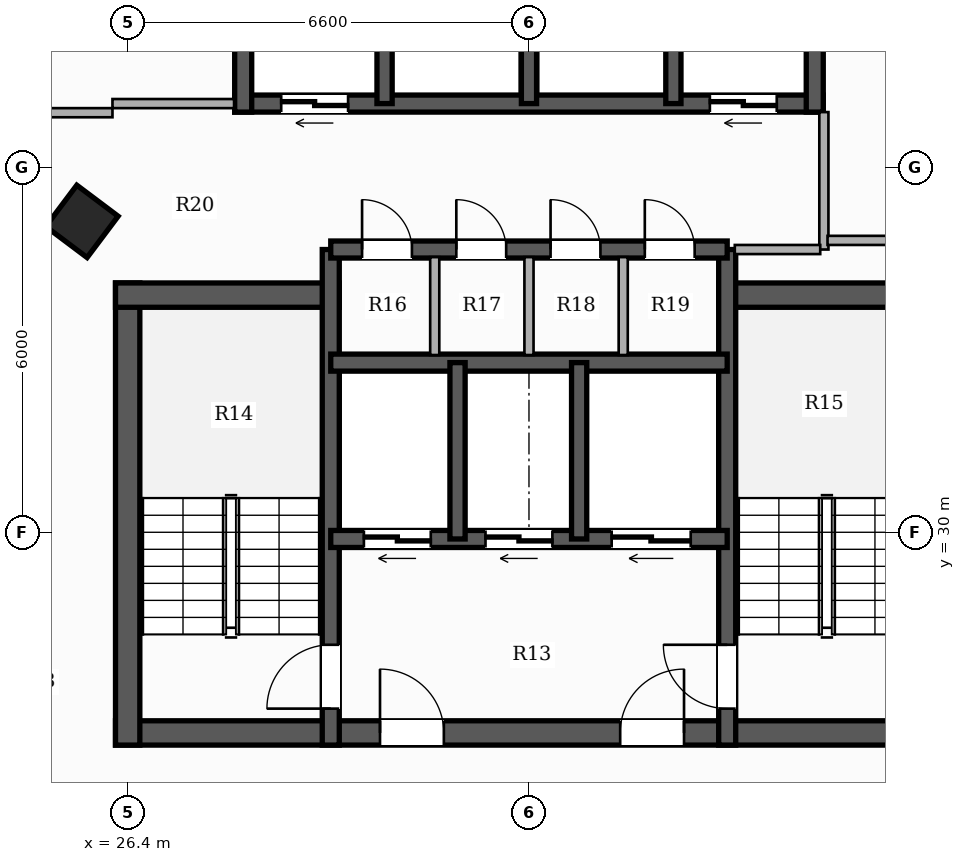
"""IFC4 building model, lengths in metres.
Left out: names, types, materials, properties, quantities, classifications, styles, units other than length and angle.
Written with IfcOpenShell. Run it as: python <this file> out.ifc"""

import sys

from ifc_helpers import new_model, si_unit, direction, frame, frame_2d, origin, origin_2d, place, context, subcontext, project, spatial, rectangle, hollow_rectangle, extrude, element, fill, save


model = new_model("IFC4")
c1 = context("Model", 3, precision=1e-05, world=origin(), true_north=direction((0.0, 1.0)))
c2 = subcontext(c1, "Body", "Model", "MODEL_VIEW")
j1 = project(units=[si_unit("LENGTHUNIT", "METRE"), si_unit("PLANEANGLEUNIT", "RADIAN")], contexts=[c1])
p1 = place(None, origin())
s1 = spatial("IfcSite", under=j1, at=p1, CompositionType="ELEMENT")
p2 = place(p1, origin())
s2 = spatial("IfcBuilding", under=s1, at=p2, CompositionType="ELEMENT")
p3 = place(p2, frame((0.0, 0.0, 133.1)))
s3 = spatial("IfcBuildingStorey", under=s2, at=p3, CompositionType="ELEMENT", Elevation=133.1)
p4 = place(p3, frame((26.2, 26.7, 0.0), z_axis=(0.0, 0.0, 1.0), x_axis=(1.0, 0.0, 0.0)))
e1 = element("IfcWall", 1, at=p4, inside=s3, PredefinedType="SHEAR", context=c2, shape_type="SweptSolid", body=[
    extrude(rectangle(XDim=13.6, YDim=0.4, at=frame_2d((6.8, 0.0))), origin(), (0.0, 0.0, 1.0), 3.3),
])
p5 = place(p4, frame((4.35, 0.0, 0.0)))
e2 = element("IfcOpeningElement", 2, at=p5, cuts=e1, PredefinedType="OPENING", context=c2, shape_type="SweptSolid", body=[
    extrude(rectangle(XDim=1.05, YDim=2.15, at=frame_2d((0.525, 1.075))), frame((0.0, 0.21, 0.0), z_axis=(0.0, -1.0, 0.0), x_axis=(1.0, 0.0, 0.0)), (0.0, 0.0, 1.0), 0.42),
])
p6 = place(p4, frame((8.3, 0.0, 0.0)))
e3 = element("IfcOpeningElement", 3, at=p6, cuts=e1, PredefinedType="OPENING", context=c2, shape_type="SweptSolid", body=[
    extrude(rectangle(XDim=1.05, YDim=2.15, at=frame_2d((0.525, 1.075))), frame((0.0, 0.21, 0.0), z_axis=(0.0, -1.0, 0.0), x_axis=(1.0, 0.0, 0.0)), (0.0, 0.0, 1.0), 0.42),
])
p7 = place(p3, frame((26.4, 26.5, 0.0), z_axis=(0.0, 0.0, 1.0), x_axis=(0.0, 1.0, 0.0)))
e4 = element("IfcWall", 4, at=p7, inside=s3, PredefinedType="SHEAR", context=c2, shape_type="SweptSolid", body=[
    extrude(rectangle(XDim=7.6, YDim=0.4, at=frame_2d((3.8, 0.0))), origin(), (0.0, 0.0, 1.0), 3.3),
])
for number, where, z_axis, x_axis in (
    (5, (26.2, 33.9, 0.0), (0.0, 0.0, 1.0), (1.0, 0.0, 0.0)),
    (6, (36.12, 33.9, 0.0), (0.0, 0.0, 1.0), (1.0, 0.0, 0.0)),
):
    element("IfcWall", number, at=place(p3, frame(where, z_axis=z_axis, x_axis=x_axis)), inside=s3, PredefinedType="SHEAR", context=c2, shape_type="SweptSolid", body=[
        extrude(rectangle(XDim=3.68, YDim=0.4, at=frame_2d((1.84, 0.0))), origin(), (0.0, 0.0, 1.0), 3.3),
    ])
p8 = place(p3, frame((29.74, 26.5, 0.0), z_axis=(0.0, 0.0, 1.0), x_axis=(0.0, 1.0, 0.0)))
e7 = element("IfcWall", 7, at=p8, inside=s3, PredefinedType="SHEAR", context=c2, shape_type="SweptSolid", body=[
    extrude(rectangle(XDim=8.15, YDim=0.28, at=frame_2d((4.075, 0.0))), origin(), (0.0, 0.0, 1.0), 3.3),
])
p9 = place(p8, frame((0.6, 0.0, 0.0)))
e8 = element("IfcOpeningElement", 8, at=p9, cuts=e7, PredefinedType="OPENING", context=c2, shape_type="SweptSolid", body=[
    extrude(rectangle(XDim=1.05, YDim=2.15, at=frame_2d((0.525, 1.075))), frame((0.0, 0.15, 0.0), z_axis=(0.0, -1.0, 0.0), x_axis=(1.0, 0.0, 0.0)), (0.0, 0.0, 1.0), 0.3),
])
p10 = place(p3, frame((36.26, 26.5, 0.0), z_axis=(0.0, 0.0, 1.0), x_axis=(0.0, 1.0, 0.0)))
e9 = element("IfcWall", 9, at=p10, inside=s3, PredefinedType="SHEAR", context=c2, shape_type="SweptSolid", body=[
    extrude(rectangle(XDim=8.15, YDim=0.28, at=frame_2d((4.075, 0.0))), origin(), (0.0, 0.0, 1.0), 3.3),
])
p11 = place(p10, frame((0.6, 0.0, 0.0)))
e10 = element("IfcOpeningElement", 10, at=p11, cuts=e9, PredefinedType="OPENING", context=c2, shape_type="SweptSolid", body=[
    extrude(rectangle(XDim=1.05, YDim=2.15, at=frame_2d((0.525, 1.075))), frame((0.0, 0.15, 0.0), z_axis=(0.0, -1.0, 0.0), x_axis=(1.0, 0.0, 0.0)), (0.0, 0.0, 1.0), 0.3),
])
p12 = place(p3, frame((36.26, 29.89, 0.0), z_axis=(0.0, 0.0, 1.0), x_axis=(-1.0, 0.0, 0.0)))
e11 = element("IfcWall", 11, at=p12, inside=s3, PredefinedType="SHEAR", context=c2, shape_type="SweptSolid", body=[
    extrude(rectangle(XDim=6.52, YDim=0.28, at=frame_2d((3.26, 0.0))), origin(), (0.0, 0.0, 1.0), 3.3),
])
p13 = place(p12, frame((4.875, 0.0, 0.0)))
e12 = element("IfcOpeningElement", 12, at=p13, cuts=e11, PredefinedType="OPENING", context=c2, shape_type="SweptSolid", body=[
    extrude(rectangle(XDim=1.1, YDim=2.2, at=frame_2d((0.55, 1.1))), frame((0.0, 0.15, 0.0), z_axis=(0.0, -1.0, 0.0), x_axis=(1.0, 0.0, 0.0)), (0.0, 0.0, 1.0), 0.3),
])
p14 = place(p12, frame((2.875, 0.0, 0.0)))
e13 = element("IfcOpeningElement", 13, at=p14, cuts=e11, PredefinedType="OPENING", context=c2, shape_type="SweptSolid", body=[
    extrude(rectangle(XDim=1.1, YDim=2.2, at=frame_2d((0.55, 1.1))), frame((0.0, 0.15, 0.0), z_axis=(0.0, -1.0, 0.0), x_axis=(1.0, 0.0, 0.0)), (0.0, 0.0, 1.0), 0.3),
])
p15 = place(p12, frame((0.6, 0.0, 0.0)))
e14 = element("IfcOpeningElement", 14, at=p15, cuts=e11, PredefinedType="OPENING", context=c2, shape_type="SweptSolid", body=[
    extrude(rectangle(XDim=1.3, YDim=2.2, at=frame_2d((0.65, 1.1))), frame((0.0, 0.15, 0.0), z_axis=(0.0, -1.0, 0.0), x_axis=(1.0, 0.0, 0.0)), (0.0, 0.0, 1.0), 0.3),
])
p16 = place(p3, frame((29.74, 32.79, 0.0), z_axis=(0.0, 0.0, 1.0), x_axis=(1.0, 0.0, 0.0)))
e15 = element("IfcWall", 15, at=p16, inside=s3, PredefinedType="SHEAR", context=c2, shape_type="SweptSolid", body=[
    extrude(rectangle(XDim=6.52, YDim=0.28, at=frame_2d((3.26, 0.0))), origin(), (0.0, 0.0, 1.0), 3.3),
])
for number, where, z_axis, x_axis in (
    (16, (31.825, 29.89, 0.0), (0.0, 0.0, 1.0), (0.0, 1.0, 0.0)),
    (17, (33.825, 29.89, 0.0), (0.0, 0.0, 1.0), (0.0, 1.0, 0.0)),
):
    element("IfcWall", number, at=place(p3, frame(where, z_axis=z_axis, x_axis=x_axis)), inside=s3, PredefinedType="SHEAR", context=c2, shape_type="SweptSolid", body=[
        extrude(rectangle(XDim=2.9, YDim=0.25, at=frame_2d((1.45, 0.0))), origin(), (0.0, 0.0, 1.0), 3.3),
    ])
p17 = place(p3, frame((29.74, 34.65, 0.0), z_axis=(0.0, 0.0, 1.0), x_axis=(1.0, 0.0, 0.0)))
e18 = element("IfcWall", 18, at=p17, inside=s3, PredefinedType="SHEAR", context=c2, shape_type="SweptSolid", body=[
    extrude(rectangle(XDim=6.52, YDim=0.28, at=frame_2d((3.26, 0.0))), origin(), (0.0, 0.0, 1.0), 3.3),
])
p18 = place(p17, frame((0.515, 0.0, 0.0)))
e19 = element("IfcOpeningElement", 19, at=p18, cuts=e18, PredefinedType="OPENING", context=c2, shape_type="SweptSolid", body=[
    extrude(rectangle(XDim=0.82, YDim=2.1, at=frame_2d((0.41, 1.05))), frame((0.0, 0.15, 0.0), z_axis=(0.0, -1.0, 0.0), x_axis=(1.0, 0.0, 0.0)), (0.0, 0.0, 1.0), 0.3),
])
p19 = place(p17, frame((2.065, 0.0, 0.0)))
e20 = element("IfcOpeningElement", 20, at=p19, cuts=e18, PredefinedType="OPENING", context=c2, shape_type="SweptSolid", body=[
    extrude(rectangle(XDim=0.82, YDim=2.1, at=frame_2d((0.41, 1.05))), frame((0.0, 0.15, 0.0), z_axis=(0.0, -1.0, 0.0), x_axis=(1.0, 0.0, 0.0)), (0.0, 0.0, 1.0), 0.3),
])
p20 = place(p17, frame((3.615, 0.0, 0.0)))
e21 = element("IfcOpeningElement", 21, at=p20, cuts=e18, PredefinedType="OPENING", context=c2, shape_type="SweptSolid", body=[
    extrude(rectangle(XDim=0.82, YDim=2.1, at=frame_2d((0.41, 1.05))), frame((0.0, 0.15, 0.0), z_axis=(0.0, -1.0, 0.0), x_axis=(1.0, 0.0, 0.0)), (0.0, 0.0, 1.0), 0.3),
])
p21 = place(p17, frame((5.165, 0.0, 0.0)))
e22 = element("IfcOpeningElement", 22, at=p21, cuts=e18, PredefinedType="OPENING", context=c2, shape_type="SweptSolid", body=[
    extrude(rectangle(XDim=0.82, YDim=2.1, at=frame_2d((0.41, 1.05))), frame((0.0, 0.15, 0.0), z_axis=(0.0, -1.0, 0.0), x_axis=(1.0, 0.0, 0.0)), (0.0, 0.0, 1.0), 0.3),
])
p22 = place(p3, frame((37.84, 37.05, 0.0), z_axis=(0.0, 0.0, 1.0), x_axis=(-1.0, 0.0, 0.0)))
e23 = element("IfcWall", 23, at=p22, inside=s3, PredefinedType="SHEAR", context=c2, shape_type="SweptSolid", body=[
    extrude(rectangle(XDim=9.68, YDim=0.28, at=frame_2d((4.84, 0.0))), origin(), (0.0, 0.0, 1.0), 3.3),
])
p23 = place(p22, frame((7.815, 0.0, 0.0)))
e24 = element("IfcOpeningElement", 24, at=p23, cuts=e23, PredefinedType="OPENING", context=c2, shape_type="SweptSolid", body=[
    extrude(rectangle(XDim=1.1, YDim=2.2, at=frame_2d((0.55, 1.1))), frame((0.0, 0.15, 0.0), z_axis=(0.0, -1.0, 0.0), x_axis=(1.0, 0.0, 0.0)), (0.0, 0.0, 1.0), 0.3),
])
p24 = place(p22, frame((0.765, 0.0, 0.0)))
e25 = element("IfcOpeningElement", 25, at=p24, cuts=e23, PredefinedType="OPENING", context=c2, shape_type="SweptSolid", body=[
    extrude(rectangle(XDim=1.1, YDim=2.2, at=frame_2d((0.55, 1.1))), frame((0.0, 0.15, 0.0), z_axis=(0.0, -1.0, 0.0), x_axis=(1.0, 0.0, 0.0)), (0.0, 0.0, 1.0), 0.3),
])
for number, where, z_axis, x_axis in (
    (26, (28.3, 36.91, 0.0), (0.0, 0.0, 1.0), (0.0, 1.0, 0.0)),
    (27, (37.7, 36.91, 0.0), (0.0, 0.0, 1.0), (0.0, 1.0, 0.0)),
):
    element("IfcWall", number, at=place(p3, frame(where, z_axis=z_axis, x_axis=x_axis)), inside=s3, PredefinedType="SHEAR", context=c2, shape_type="SweptSolid", body=[
        extrude(rectangle(XDim=2.83, YDim=0.28, at=frame_2d((1.415, 0.0))), origin(), (0.0, 0.0, 1.0), 3.3),
    ])
for number, where, z_axis, x_axis in (
    (28, (30.625, 37.05, 0.0), (0.0, 0.0, 1.0), (0.0, 1.0, 0.0)),
    (29, (33.0, 37.05, 0.0), (0.0, 0.0, 1.0), (0.0, 1.0, 0.0)),
    (30, (35.375, 37.05, 0.0), (0.0, 0.0, 1.0), (0.0, 1.0, 0.0)),
):
    element("IfcWall", number, at=place(p3, frame(where, z_axis=z_axis, x_axis=x_axis)), inside=s3, PredefinedType="SHEAR", context=c2, shape_type="SweptSolid", body=[
        extrude(rectangle(XDim=2.55, YDim=0.25, at=frame_2d((1.275, 0.0))), origin(), (0.0, 0.0, 1.0), 3.3),
    ])
p25 = place(p3, frame((25.648, 35.113, 0.0), z_axis=(0.0, 0.0, 1.0), x_axis=(0.600420225326, 0.799684658487, 0.0)))
e31 = element("IfcColumn", 31, at=p25, inside=s3, PredefinedType="COLUMN", context=c2, shape_type="SweptSolid", body=[
    extrude(hollow_rectangle(XDim=0.85, YDim=0.85, WallThickness=0.028, at=origin_2d()), origin(), (0.0, 0.0, 1.0), 3.3),
])
p26 = place(p3, frame((37.85, 34.65, 0.0), z_axis=(0.0, 0.0, 1.0), x_axis=(0.0, 1.0, 0.0)))
e32 = element("IfcWall", 32, at=p26, inside=s3, PredefinedType="PARTITIONING", context=c2, shape_type="SweptSolid", body=[
    extrude(rectangle(XDim=2.26, YDim=0.15, at=frame_2d((1.13, 0.0))), origin(), (0.0, 0.0, 1.0), 3.06),
])
p27 = place(p3, frame((36.385, 34.65, 0.0), z_axis=(0.0, 0.0, 1.0), x_axis=(1.0, 0.0, 0.0)))
e33 = element("IfcWall", 33, at=p27, inside=s3, PredefinedType="PARTITIONING", context=c2, shape_type="SweptSolid", body=[
    extrude(rectangle(XDim=1.405, YDim=0.15, at=frame_2d((0.703, 0.0))), origin(), (0.0, 0.0, 1.0), 2.425),
])
for number, where, z_axis, x_axis in (
    (34, (31.45, 32.915, 0.0), (0.0, 0.0, 1.0), (0.0, 1.0, 0.0)),
    (35, (33.0, 32.915, 0.0), (0.0, 0.0, 1.0), (0.0, 1.0, 0.0)),
    (36, (34.55, 32.915, 0.0), (0.0, 0.0, 1.0), (0.0, 1.0, 0.0)),
):
    element("IfcWall", number, at=place(p3, frame(where, z_axis=z_axis, x_axis=x_axis)), inside=s3, PredefinedType="PARTITIONING", context=c2, shape_type="SweptSolid", body=[
        extrude(rectangle(XDim=1.61, YDim=0.15, at=frame_2d((0.805, 0.0))), origin(), (0.0, 0.0, 1.0), 3.06),
    ])
p28 = place(p3, frame((23.56, 36.9, 0.0), z_axis=(0.0, 0.0, 1.0), x_axis=(1.0, 0.0, 0.0)))
e37 = element("IfcWall", 37, at=p28, inside=s3, PredefinedType="PARTITIONING", context=c2, shape_type="SweptSolid", body=[
    extrude(rectangle(XDim=2.59, YDim=0.15, at=frame_2d((1.295, 0.0))), origin(), (0.0, 0.0, 1.0), 2.413),
])
p29 = place(p28, frame((0.515, 0.0, 0.0)))
e38 = element("IfcOpeningElement", 38, at=p29, cuts=e37, PredefinedType="OPENING", context=c2, shape_type="SweptSolid", body=[
    extrude(rectangle(XDim=0.88, YDim=2.1, at=frame_2d((0.44, 1.05))), frame((0.0, 0.085, 0.0), z_axis=(0.0, -1.0, 0.0), x_axis=(1.0, 0.0, 0.0)), (0.0, 0.0, 1.0), 0.17),
])
p30 = place(p3, frame((26.15, 37.05, 0.0), z_axis=(0.0, 0.0, 1.0), x_axis=(1.0, 0.0, 0.0)))
e39 = element("IfcWall", 39, at=p30, inside=s3, PredefinedType="PARTITIONING", context=c2, shape_type="SweptSolid", body=[
    extrude(rectangle(XDim=2.0, YDim=0.15, at=frame_2d((1.0, 0.0))), origin(), (0.0, 0.0, 1.0), 2.413),
])
p31 = place(p3, frame((37.91, 34.8, 0.0), z_axis=(0.0, 0.0, 1.0), x_axis=(1.0, 0.0, 0.0)))
e40 = element("IfcWall", 40, at=p31, inside=s3, PredefinedType="PARTITIONING", context=c2, shape_type="SweptSolid", body=[
    extrude(rectangle(XDim=1.94, YDim=0.15, at=frame_2d((0.97, 0.0))), origin(), (0.0, 0.0, 1.0), 2.721),
])
p32 = place(p9, origin())
e41 = element("IfcDoor", 41, at=p32, inside=s3, OperationType="SINGLE_SWING_LEFT", PredefinedType="DOOR", context=c2, shape_type="SweptSolid", body=[
    extrude(rectangle(XDim=1.05, YDim=2.15, at=frame_2d((0.525, 1.075))), frame((0.0, 0.025, 0.0), z_axis=(0.0, -1.0, 0.0), x_axis=(1.0, 0.0, 0.0)), (0.0, 0.0, 1.0), 0.05),
])
fill(e8, e41)
p33 = place(p11, origin())
e42 = element("IfcDoor", 42, at=p33, inside=s3, OperationType="SINGLE_SWING_RIGHT", PredefinedType="DOOR", context=c2, shape_type="SweptSolid", body=[
    extrude(rectangle(XDim=1.05, YDim=2.15, at=frame_2d((0.525, 1.075))), frame((0.0, 0.025, 0.0), z_axis=(0.0, -1.0, 0.0), x_axis=(1.0, 0.0, 0.0)), (0.0, 0.0, 1.0), 0.05),
])
fill(e10, e42)
p34 = place(p5, origin())
e43 = element("IfcDoor", 43, at=p34, inside=s3, OperationType="SINGLE_SWING_LEFT", PredefinedType="DOOR", context=c2, shape_type="SweptSolid", body=[
    extrude(rectangle(XDim=1.05, YDim=2.15, at=frame_2d((0.525, 1.075))), frame((0.0, 0.025, 0.0), z_axis=(0.0, -1.0, 0.0), x_axis=(1.0, 0.0, 0.0)), (0.0, 0.0, 1.0), 0.05),
])
fill(e2, e43)
p35 = place(p6, origin())
e44 = element("IfcDoor", 44, at=p35, inside=s3, OperationType="SINGLE_SWING_RIGHT", PredefinedType="DOOR", context=c2, shape_type="SweptSolid", body=[
    extrude(rectangle(XDim=1.05, YDim=2.15, at=frame_2d((0.525, 1.075))), frame((0.0, 0.025, 0.0), z_axis=(0.0, -1.0, 0.0), x_axis=(1.0, 0.0, 0.0)), (0.0, 0.0, 1.0), 0.05),
])
fill(e3, e44)
p36 = place(p13, origin())
e45 = element("IfcDoor", 45, at=p36, inside=s3, OperationType="DOUBLE_DOOR_SLIDING", PredefinedType="DOOR", context=c2, shape_type="SweptSolid", body=[
    extrude(rectangle(XDim=1.1, YDim=2.2, at=frame_2d((0.55, 1.1))), frame((0.0, 0.025, 0.0), z_axis=(0.0, -1.0, 0.0), x_axis=(1.0, 0.0, 0.0)), (0.0, 0.0, 1.0), 0.05),
])
fill(e12, e45)
p37 = place(p14, origin())
e46 = element("IfcDoor", 46, at=p37, inside=s3, OperationType="DOUBLE_DOOR_SLIDING", PredefinedType="DOOR", context=c2, shape_type="SweptSolid", body=[
    extrude(rectangle(XDim=1.1, YDim=2.2, at=frame_2d((0.55, 1.1))), frame((0.0, 0.025, 0.0), z_axis=(0.0, -1.0, 0.0), x_axis=(1.0, 0.0, 0.0)), (0.0, 0.0, 1.0), 0.05),
])
fill(e13, e46)
p38 = place(p15, origin())
e47 = element("IfcDoor", 47, at=p38, inside=s3, OperationType="DOUBLE_DOOR_SLIDING", PredefinedType="DOOR", context=c2, shape_type="SweptSolid", body=[
    extrude(rectangle(XDim=1.3, YDim=2.2, at=frame_2d((0.65, 1.1))), frame((0.0, 0.025, 0.0), z_axis=(0.0, -1.0, 0.0), x_axis=(1.0, 0.0, 0.0)), (0.0, 0.0, 1.0), 0.05),
])
fill(e14, e47)
p39 = place(p23, origin())
e48 = element("IfcDoor", 48, at=p39, inside=s3, OperationType="DOUBLE_DOOR_SLIDING", PredefinedType="DOOR", context=c2, shape_type="SweptSolid", body=[
    extrude(rectangle(XDim=1.1, YDim=2.2, at=frame_2d((0.55, 1.1))), frame((0.0, 0.025, 0.0), z_axis=(0.0, -1.0, 0.0), x_axis=(1.0, 0.0, 0.0)), (0.0, 0.0, 1.0), 0.05),
])
fill(e24, e48)
p40 = place(p24, origin())
e49 = element("IfcDoor", 49, at=p40, inside=s3, OperationType="DOUBLE_DOOR_SLIDING", PredefinedType="DOOR", context=c2, shape_type="SweptSolid", body=[
    extrude(rectangle(XDim=1.1, YDim=2.2, at=frame_2d((0.55, 1.1))), frame((0.0, 0.025, 0.0), z_axis=(0.0, -1.0, 0.0), x_axis=(1.0, 0.0, 0.0)), (0.0, 0.0, 1.0), 0.05),
])
fill(e25, e49)
p41 = place(p18, origin())
e50 = element("IfcDoor", 50, at=p41, inside=s3, OperationType="SINGLE_SWING_LEFT", PredefinedType="DOOR", context=c2, shape_type="SweptSolid", body=[
    extrude(rectangle(XDim=0.82, YDim=2.1, at=frame_2d((0.41, 1.05))), frame((0.0, 0.025, 0.0), z_axis=(0.0, -1.0, 0.0), x_axis=(1.0, 0.0, 0.0)), (0.0, 0.0, 1.0), 0.05),
])
fill(e19, e50)
p42 = place(p19, origin())
e51 = element("IfcDoor", 51, at=p42, inside=s3, OperationType="SINGLE_SWING_LEFT", PredefinedType="DOOR", context=c2, shape_type="SweptSolid", body=[
    extrude(rectangle(XDim=0.82, YDim=2.1, at=frame_2d((0.41, 1.05))), frame((0.0, 0.025, 0.0), z_axis=(0.0, -1.0, 0.0), x_axis=(1.0, 0.0, 0.0)), (0.0, 0.0, 1.0), 0.05),
])
fill(e20, e51)
p43 = place(p20, origin())
e52 = element("IfcDoor", 52, at=p43, inside=s3, OperationType="SINGLE_SWING_LEFT", PredefinedType="DOOR", context=c2, shape_type="SweptSolid", body=[
    extrude(rectangle(XDim=0.82, YDim=2.1, at=frame_2d((0.41, 1.05))), frame((0.0, 0.025, 0.0), z_axis=(0.0, -1.0, 0.0), x_axis=(1.0, 0.0, 0.0)), (0.0, 0.0, 1.0), 0.05),
])
fill(e21, e52)
p44 = place(p21, origin())
e53 = element("IfcDoor", 53, at=p44, inside=s3, OperationType="SINGLE_SWING_LEFT", PredefinedType="DOOR", context=c2, shape_type="SweptSolid", body=[
    extrude(rectangle(XDim=0.82, YDim=2.1, at=frame_2d((0.41, 1.05))), frame((0.0, 0.025, 0.0), z_axis=(0.0, -1.0, 0.0), x_axis=(1.0, 0.0, 0.0)), (0.0, 0.0, 1.0), 0.05),
])
fill(e22, e53)
save(model, sys.argv[1])
